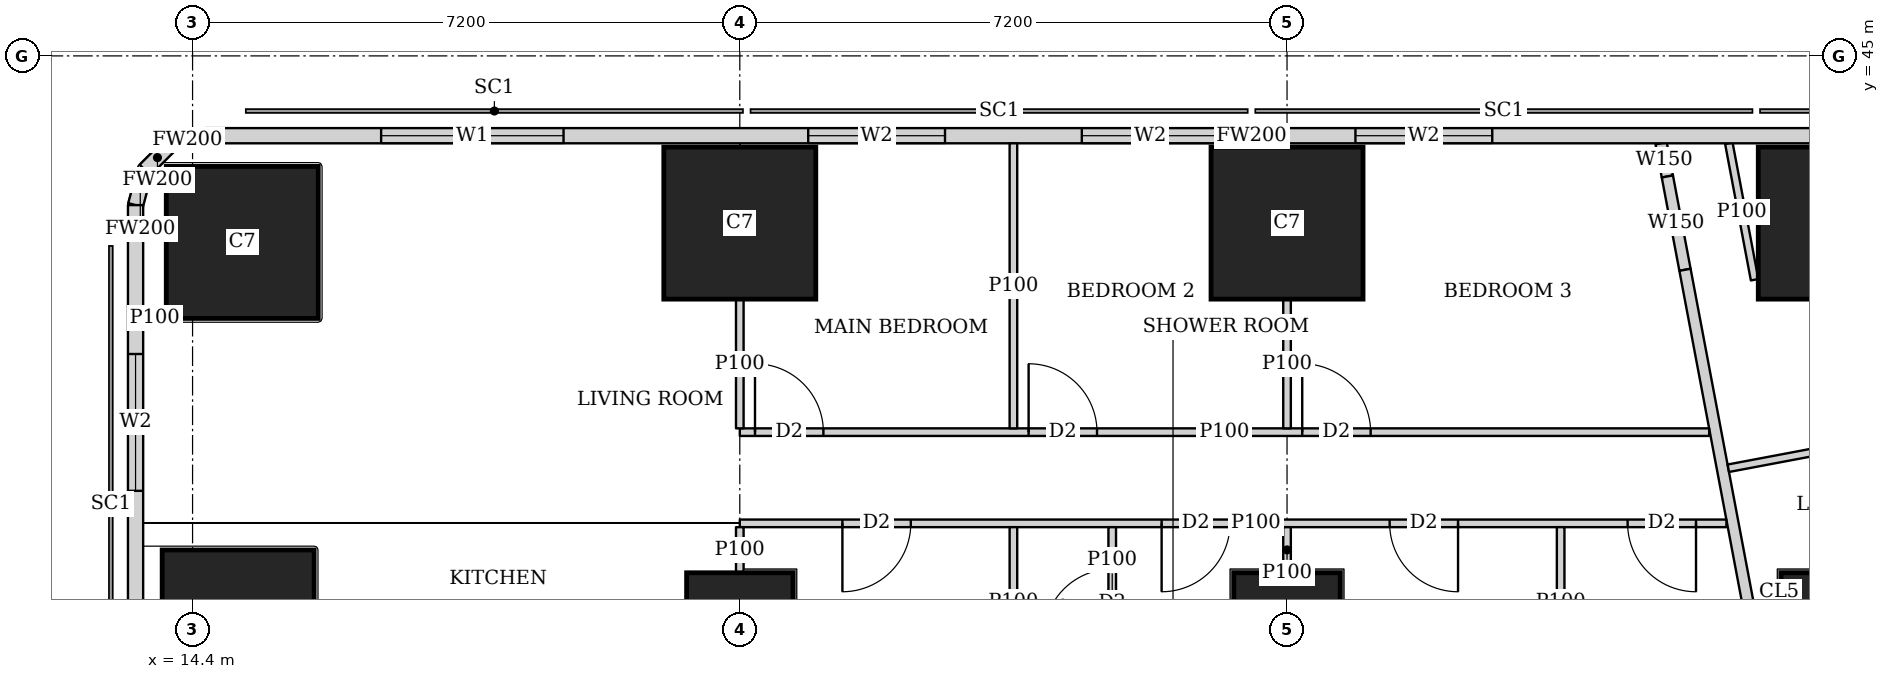
"""IFC4 building model, lengths in metres.
Left out: names, types, materials, properties, quantities, classifications, styles, units other than length and angle.
Written with IfcOpenShell. Run it as: python <this file> out.ifc"""

import sys

from ifc_helpers import new_model, si_unit, direction, frame, frame_2d, origin, origin_2d, place, context, subcontext, project, spatial, rectangle, extrude, element, fill, save


model = new_model("IFC4")
c1 = context("Model", 3, precision=1e-05, world=origin(), true_north=direction((0.0, 1.0)))
c2 = subcontext(c1, "Body", "Model", "MODEL_VIEW")
j1 = project(units=[si_unit("LENGTHUNIT", "METRE"), si_unit("PLANEANGLEUNIT", "RADIAN")], contexts=[c1])
p1 = place(None, origin())
s1 = spatial("IfcSite", under=j1, at=p1, CompositionType="ELEMENT")
p2 = place(p1, origin())
s2 = spatial("IfcBuilding", under=s1, at=p2, CompositionType="ELEMENT")
p3 = place(p2, frame((0.0, 0.0, 266.6)))
s3 = spatial("IfcBuildingStorey", under=s2, at=p3, CompositionType="ELEMENT", Elevation=266.6)
p4 = place(p3, frame((15.0, 37.5, 0.0), z_axis=(0.0, 0.0, 1.0), x_axis=(1.0, 0.0, 0.0)))
e1 = element("IfcColumn", 1, at=p4, inside=s3, PredefinedType="COLUMN", context=c2, shape_type="SweptSolid", body=[
    extrude(rectangle(XDim=2.0, YDim=2.0, at=origin_2d()), origin(), (0.0, 0.0, 1.0), 3.75),
])
for number, where, z_axis, x_axis in (
    (2, (21.6, 37.5, 0.0), (0.0, 0.0, 1.0), (1.0, 0.0, 0.0)),
    (3, (28.8, 37.5, 0.0), (0.0, 0.0, 1.0), (1.0, 0.0, 0.0)),
    (4, (36.0, 37.5, 0.0), (0.0, 0.0, 1.0), (1.0, 0.0, 0.0)),
):
    element("IfcColumn", number, at=place(p3, frame(where, z_axis=z_axis, x_axis=x_axis)), inside=s3, PredefinedType="COLUMN", context=c2, shape_type="SweptSolid", body=[
        extrude(rectangle(XDim=1.4, YDim=1.4, at=origin_2d()), origin(), (0.0, 0.0, 1.0), 3.75),
    ])
for number, where, z_axis, x_axis in (
    (5, (15.054, 42.546, 0.0), (0.0, 0.0, 1.0), (1.0, 0.0, 0.0)),
    (6, (21.6, 42.8, 0.0), (0.0, 0.0, 1.0), (1.0, 0.0, 0.0)),
    (7, (28.8, 42.8, 0.0), (0.0, 0.0, 1.0), (1.0, 0.0, 0.0)),
    (8, (36.0, 42.8, 0.0), (0.0, 0.0, 1.0), (1.0, 0.0, 0.0)),
):
    element("IfcColumn", number, at=place(p3, frame(where, z_axis=z_axis, x_axis=x_axis)), inside=s3, PredefinedType="COLUMN", context=c2, shape_type="SweptSolid", body=[
        extrude(rectangle(XDim=2.0, YDim=2.0, at=origin_2d()), origin(), (0.0, 0.0, 1.0), 3.75),
    ])
p5 = place(p3, frame((42.103, 43.95, 0.0), z_axis=(0.0, 0.0, 1.0), x_axis=(-1.0, 0.0, 0.0)))
e9 = element("IfcWall", 9, at=p5, inside=s3, PredefinedType="SOLIDWALL", context=c2, shape_type="SweptSolid", body=[
    extrude(rectangle(XDim=27.54, YDim=0.2, at=frame_2d((13.77, 0.0))), origin(), (0.0, 0.0, 1.0), 3.5),
])
p6 = place(p5, frame((10.603, 0.0, 0.9)))
e10 = element("IfcOpeningElement", 10, at=p6, cuts=e9, PredefinedType="OPENING", context=c2, shape_type="SweptSolid", body=[
    extrude(rectangle(XDim=1.8, YDim=1.5, at=frame_2d((0.9, 0.75))), frame((0.0, 0.11, 0.0), z_axis=(0.0, -1.0, 0.0), x_axis=(1.0, 0.0, 0.0)), (0.0, 0.0, 1.0), 0.22),
])
p7 = place(p5, frame((14.203, 0.0, 0.9)))
e11 = element("IfcOpeningElement", 11, at=p7, cuts=e9, PredefinedType="OPENING", context=c2, shape_type="SweptSolid", body=[
    extrude(rectangle(XDim=1.8, YDim=1.5, at=frame_2d((0.9, 0.75))), frame((0.0, 0.11, 0.0), z_axis=(0.0, -1.0, 0.0), x_axis=(1.0, 0.0, 0.0)), (0.0, 0.0, 1.0), 0.22),
])
p8 = place(p5, frame((17.803, 0.0, 0.9)))
e12 = element("IfcOpeningElement", 12, at=p8, cuts=e9, PredefinedType="OPENING", context=c2, shape_type="SweptSolid", body=[
    extrude(rectangle(XDim=1.8, YDim=1.5, at=frame_2d((0.9, 0.75))), frame((0.0, 0.11, 0.0), z_axis=(0.0, -1.0, 0.0), x_axis=(1.0, 0.0, 0.0)), (0.0, 0.0, 1.0), 0.22),
])
p9 = place(p5, frame((22.822, 0.0, 0.9)))
e13 = element("IfcOpeningElement", 13, at=p9, cuts=e9, PredefinedType="OPENING", context=c2, shape_type="SweptSolid", body=[
    extrude(rectangle(XDim=2.4, YDim=1.5, at=frame_2d((1.2, 0.75))), frame((0.0, 0.11, 0.0), z_axis=(0.0, -1.0, 0.0), x_axis=(1.0, 0.0, 0.0)), (0.0, 0.0, 1.0), 0.22),
])
p10 = place(p3, frame((14.563, 43.95, 0.0), z_axis=(0.0, 0.0, 1.0), x_axis=(-0.965655254015, -0.259826731483, 0.0)))
e14 = element("IfcWall", 14, at=p10, inside=s3, PredefinedType="SOLIDWALL", context=c2, shape_type="SweptSolid", body=[
    extrude(rectangle(XDim=0.477, YDim=0.2, at=frame_2d((0.239, 0.0))), origin(), (0.0, 0.0, 1.0), 3.5),
])
p11 = place(p3, frame((14.102, 43.826, 0.0), z_axis=(0.0, 0.0, 1.0), x_axis=(-0.707369890659, -0.706843573776, 0.0)))
e15 = element("IfcWall", 15, at=p11, inside=s3, PredefinedType="SOLIDWALL", context=c2, shape_type="SweptSolid", body=[
    extrude(rectangle(XDim=0.464, YDim=0.2, at=frame_2d((0.232, 0.0))), origin(), (0.0, 0.0, 1.0), 3.5),
])
p12 = place(p3, frame((13.774, 43.498, 0.0), z_axis=(0.0, 0.0, 1.0), x_axis=(-0.259826731483, -0.965655254015, 0.0)))
e16 = element("IfcWall", 16, at=p12, inside=s3, PredefinedType="SOLIDWALL", context=c2, shape_type="SweptSolid", body=[
    extrude(rectangle(XDim=0.477, YDim=0.2, at=frame_2d((0.239, 0.0))), origin(), (0.0, 0.0, 1.0), 3.5),
])
p13 = place(p3, frame((13.65, 43.037, 0.0), z_axis=(0.0, 0.0, 1.0), x_axis=(0.0, -1.0, 0.0)))
e17 = element("IfcWall", 17, at=p13, inside=s3, PredefinedType="SOLIDWALL", context=c2, shape_type="SweptSolid", body=[
    extrude(rectangle(XDim=35.374, YDim=0.2, at=frame_2d((17.687, 0.0))), origin(), (0.0, 0.0, 1.0), 3.5),
])
p14 = place(p13, frame((1.959, 0.0, 0.9)))
e18 = element("IfcOpeningElement", 18, at=p14, cuts=e17, PredefinedType="OPENING", context=c2, shape_type="SweptSolid", body=[
    extrude(rectangle(XDim=1.8, YDim=1.5, at=frame_2d((0.9, 0.75))), frame((0.0, 0.11, 0.0), z_axis=(0.0, -1.0, 0.0), x_axis=(1.0, 0.0, 0.0)), (0.0, 0.0, 1.0), 0.22),
])
p15 = place(p3, frame((33.722, 43.85, 0.0), z_axis=(0.0, 0.0, 1.0), x_axis=(0.184886516626, -0.982759877066, 0.0)))
e19 = element("IfcWall", 19, at=p15, inside=s3, PredefinedType="SOLIDWALL", context=c2, shape_type="SweptSolid", body=[
    extrude(rectangle(XDim=0.444, YDim=0.15, at=frame_2d((0.222, 0.0))), origin(), (0.0, 0.0, 1.0), 3.5),
])
p16 = place(p3, frame((33.804, 43.414, 0.0), z_axis=(0.0, 0.0, 1.0), x_axis=(0.185585816539, -0.982628060204, 0.0)))
e20 = element("IfcWall", 20, at=p16, inside=s3, PredefinedType="SOLIDWALL", context=c2, shape_type="SweptSolid", body=[
    extrude(rectangle(XDim=1.25, YDim=0.15, at=frame_2d((0.625, 0.0))), origin(), (0.0, 0.0, 1.0), 2.05),
])
p17 = place(p3, frame((34.036, 42.186, 0.0), z_axis=(0.0, 0.0, 1.0), x_axis=(0.185593518645, -0.9826266055, 0.0)))
e21 = element("IfcWall", 21, at=p17, inside=s3, PredefinedType="SOLIDWALL", context=c2, shape_type="SweptSolid", body=[
    extrude(rectangle(XDim=35.961, YDim=0.15, at=frame_2d((17.98, 0.0))), origin(), (0.0, 0.0, 1.0), 2.5),
])
p18 = place(p17, frame((15.529, 0.0, 0.0)))
e22 = element("IfcOpeningElement", 22, at=p18, cuts=e21, PredefinedType="OPENING", context=c2, shape_type="SweptSolid", body=[
    extrude(rectangle(XDim=1.0, YDim=2.1, at=frame_2d((0.5, 1.05))), frame((0.0, 0.085, 0.0), z_axis=(0.0, -1.0, 0.0), x_axis=(1.0, 0.0, 0.0)), (0.0, 0.0, 1.0), 0.17),
])
p19 = place(p17, frame((19.345, 0.0, 0.0)))
e23 = element("IfcOpeningElement", 23, at=p19, cuts=e21, PredefinedType="OPENING", context=c2, shape_type="SweptSolid", body=[
    extrude(rectangle(XDim=1.0, YDim=2.1, at=frame_2d((0.5, 1.05))), frame((0.0, 0.085, 0.0), z_axis=(0.0, -1.0, 0.0), x_axis=(1.0, 0.0, 0.0)), (0.0, 0.0, 1.0), 0.17),
])
p20 = place(p17, frame((30.594, 0.0, 0.0)))
e24 = element("IfcOpeningElement", 24, at=p20, cuts=e21, PredefinedType="OPENING", context=c2, shape_type="SweptSolid", body=[
    extrude(rectangle(XDim=1.0, YDim=2.1, at=frame_2d((0.5, 1.05))), frame((0.0, 0.085, 0.0), z_axis=(0.0, -1.0, 0.0), x_axis=(1.0, 0.0, 0.0)), (0.0, 0.0, 1.0), 0.17),
])
p21 = place(p3, frame((34.952, 42.055, 0.0), z_axis=(0.0, 0.0, 1.0), x_axis=(-0.185490642006, 0.98264603074, 0.0)))
e25 = element("IfcWall", 25, at=p21, inside=s3, PredefinedType="PARTITIONING", context=c2, shape_type="SweptSolid", body=[
    extrude(rectangle(XDim=1.827, YDim=0.1, at=frame_2d((0.914, 0.0))), origin(), (0.0, 0.0, 1.0), 2.05),
])
p22 = place(p3, frame((37.824, 40.182, 0.0), z_axis=(0.0, 0.0, 1.0), x_axis=(-0.982674977865, -0.185337227447, 0.0)))
e26 = element("IfcWall", 26, at=p22, inside=s3, PredefinedType="PARTITIONING", context=c2, shape_type="SweptSolid", body=[
    extrude(rectangle(XDim=3.275, YDim=0.1, at=frame_2d((1.637, 0.0))), origin(), (0.0, 0.0, 1.0), 3.5),
])
p23 = place(p3, frame((14.054, 41.546, 0.0), z_axis=(0.0, 0.0, 1.0), x_axis=(-1.0, 0.0, 0.0)))
e27 = element("IfcWall", 27, at=p23, inside=s3, PredefinedType="PARTITIONING", context=c2, shape_type="SweptSolid", body=[
    extrude(rectangle(XDim=0.304, YDim=0.1, at=frame_2d((0.152, 0.0))), origin(), (0.0, 0.0, 1.0), 3.5),
])
p24 = place(p3, frame((21.6, 40.05, 0.0), z_axis=(0.0, 0.0, 1.0), x_axis=(1.0, 0.0, 0.0)))
e28 = element("IfcWall", 28, at=p24, inside=s3, PredefinedType="PARTITIONING", context=c2, shape_type="SweptSolid", body=[
    extrude(rectangle(XDim=12.754, YDim=0.1, at=frame_2d((6.377, 0.0))), origin(), (0.0, 0.0, 1.0), 3.5),
])
p25 = place(p24, frame((0.2, 0.0, 0.0)))
e29 = element("IfcOpeningElement", 29, at=p25, cuts=e28, PredefinedType="OPENING", context=c2, shape_type="SweptSolid", body=[
    extrude(rectangle(XDim=0.9, YDim=2.1, at=frame_2d((0.45, 1.05))), frame((0.0, 0.06, 0.0), z_axis=(0.0, -1.0, 0.0), x_axis=(1.0, 0.0, 0.0)), (0.0, 0.0, 1.0), 0.12),
])
p26 = place(p24, frame((3.8, 0.0, 0.0)))
e30 = element("IfcOpeningElement", 30, at=p26, cuts=e28, PredefinedType="OPENING", context=c2, shape_type="SweptSolid", body=[
    extrude(rectangle(XDim=0.9, YDim=2.1, at=frame_2d((0.45, 1.05))), frame((0.0, 0.06, 0.0), z_axis=(0.0, -1.0, 0.0), x_axis=(1.0, 0.0, 0.0)), (0.0, 0.0, 1.0), 0.12),
])
p27 = place(p24, frame((7.4, 0.0, 0.0)))
e31 = element("IfcOpeningElement", 31, at=p27, cuts=e28, PredefinedType="OPENING", context=c2, shape_type="SweptSolid", body=[
    extrude(rectangle(XDim=0.9, YDim=2.1, at=frame_2d((0.45, 1.05))), frame((0.0, 0.06, 0.0), z_axis=(0.0, -1.0, 0.0), x_axis=(1.0, 0.0, 0.0)), (0.0, 0.0, 1.0), 0.12),
])
p28 = place(p3, frame((21.6, 38.85, 0.0), z_axis=(0.0, 0.0, 1.0), x_axis=(1.0, 0.0, 0.0)))
e32 = element("IfcWall", 32, at=p28, inside=s3, PredefinedType="PARTITIONING", context=c2, shape_type="SweptSolid", body=[
    extrude(rectangle(XDim=12.981, YDim=0.1, at=frame_2d((6.49, 0.0))), origin(), (0.0, 0.0, 1.0), 3.5),
])
p29 = place(p28, frame((1.35, 0.0, 0.0)))
e33 = element("IfcOpeningElement", 33, at=p29, cuts=e32, PredefinedType="OPENING", context=c2, shape_type="SweptSolid", body=[
    extrude(rectangle(XDim=0.9, YDim=2.1, at=frame_2d((0.45, 1.05))), frame((0.0, 0.06, 0.0), z_axis=(0.0, -1.0, 0.0), x_axis=(1.0, 0.0, 0.0)), (0.0, 0.0, 1.0), 0.12),
])
p30 = place(p28, frame((5.55, 0.0, 0.0)))
e34 = element("IfcOpeningElement", 34, at=p30, cuts=e32, PredefinedType="OPENING", context=c2, shape_type="SweptSolid", body=[
    extrude(rectangle(XDim=0.9, YDim=2.1, at=frame_2d((0.45, 1.05))), frame((0.0, 0.06, 0.0), z_axis=(0.0, -1.0, 0.0), x_axis=(1.0, 0.0, 0.0)), (0.0, 0.0, 1.0), 0.12),
])
p31 = place(p28, frame((8.55, 0.0, 0.0)))
e35 = element("IfcOpeningElement", 35, at=p31, cuts=e32, PredefinedType="OPENING", context=c2, shape_type="SweptSolid", body=[
    extrude(rectangle(XDim=0.9, YDim=2.1, at=frame_2d((0.45, 1.05))), frame((0.0, 0.06, 0.0), z_axis=(0.0, -1.0, 0.0), x_axis=(1.0, 0.0, 0.0)), (0.0, 0.0, 1.0), 0.12),
])
p32 = place(p28, frame((11.681, 0.0, 0.0)))
e36 = element("IfcOpeningElement", 36, at=p32, cuts=e32, PredefinedType="OPENING", context=c2, shape_type="SweptSolid", body=[
    extrude(rectangle(XDim=0.9, YDim=2.1, at=frame_2d((0.45, 1.05))), frame((0.0, 0.06, 0.0), z_axis=(0.0, -1.0, 0.0), x_axis=(1.0, 0.0, 0.0)), (0.0, 0.0, 1.0), 0.12),
])
p33 = place(p3, frame((21.6, 40.1, 0.0), z_axis=(0.0, 0.0, 1.0), x_axis=(0.0, 1.0, 0.0)))
e37 = element("IfcWall", 37, at=p33, inside=s3, PredefinedType="PARTITIONING", context=c2, shape_type="SweptSolid", body=[
    extrude(rectangle(XDim=1.699, YDim=0.1, at=frame_2d((0.85, 0.0))), origin(), (0.0, 0.0, 1.0), 3.5),
])
p34 = place(p3, frame((25.2, 40.1, 0.0), z_axis=(0.0, 0.0, 1.0), x_axis=(0.0, 1.0, 0.0)))
e38 = element("IfcWall", 38, at=p34, inside=s3, PredefinedType="PARTITIONING", context=c2, shape_type="SweptSolid", body=[
    extrude(rectangle(XDim=3.75, YDim=0.1, at=frame_2d((1.875, 0.0))), origin(), (0.0, 0.0, 1.0), 2.05),
])
p35 = place(p3, frame((28.8, 40.1, 0.0), z_axis=(0.0, 0.0, 1.0), x_axis=(0.0, 1.0, 0.0)))
e39 = element("IfcWall", 39, at=p35, inside=s3, PredefinedType="PARTITIONING", context=c2, shape_type="SweptSolid", body=[
    extrude(rectangle(XDim=1.699, YDim=0.1, at=frame_2d((0.85, 0.0))), origin(), (0.0, 0.0, 1.0), 3.5),
])
p36 = place(p3, frame((21.6, 38.201, 0.0), z_axis=(0.0, 0.0, 1.0), x_axis=(0.0, 1.0, 0.0)))
e40 = element("IfcWall", 40, at=p36, inside=s3, PredefinedType="PARTITIONING", context=c2, shape_type="SweptSolid", body=[
    extrude(rectangle(XDim=0.599, YDim=0.1, at=frame_2d((0.3, 0.0))), origin(), (0.0, 0.0, 1.0), 3.5),
])
p37 = place(p3, frame((25.2, 36.825, 0.0), z_axis=(0.0, 0.0, 1.0), x_axis=(0.0, 1.0, 0.0)))
e41 = element("IfcWall", 41, at=p37, inside=s3, PredefinedType="PARTITIONING", context=c2, shape_type="SweptSolid", body=[
    extrude(rectangle(XDim=1.975, YDim=0.1, at=frame_2d((0.988, 0.0))), origin(), (0.0, 0.0, 1.0), 3.5),
])
p38 = place(p3, frame((28.8, 38.201, 0.0), z_axis=(0.0, 0.0, 1.0), x_axis=(0.0, 1.0, 0.0)))
e42 = element("IfcWall", 42, at=p38, inside=s3, PredefinedType="PARTITIONING", context=c2, shape_type="SweptSolid", body=[
    extrude(rectangle(XDim=0.599, YDim=0.1, at=frame_2d((0.3, 0.0))), origin(), (0.0, 0.0, 1.0), 3.5),
])
p39 = place(p3, frame((32.4, 36.825, 0.0), z_axis=(0.0, 0.0, 1.0), x_axis=(0.0, 1.0, 0.0)))
e43 = element("IfcWall", 43, at=p39, inside=s3, PredefinedType="PARTITIONING", context=c2, shape_type="SweptSolid", body=[
    extrude(rectangle(XDim=1.975, YDim=0.1, at=frame_2d((0.988, 0.0))), origin(), (0.0, 0.0, 1.0), 3.5),
])
p40 = place(p3, frame((26.5, 36.825, 0.0), z_axis=(0.0, 0.0, 1.0), x_axis=(0.0, 1.0, 0.0)))
e44 = element("IfcWall", 44, at=p40, inside=s3, PredefinedType="PARTITIONING", context=c2, shape_type="SweptSolid", body=[
    extrude(rectangle(XDim=1.975, YDim=0.1, at=frame_2d((0.988, 0.0))), origin(), (0.0, 0.0, 1.0), 3.5),
])
p41 = place(p40, frame((0.525, 0.0, 0.0)))
e45 = element("IfcOpeningElement", 45, at=p41, cuts=e44, PredefinedType="OPENING", context=c2, shape_type="SweptSolid", body=[
    extrude(rectangle(XDim=0.9, YDim=2.1, at=frame_2d((0.45, 1.05))), frame((0.0, 0.06, 0.0), z_axis=(0.0, -1.0, 0.0), x_axis=(1.0, 0.0, 0.0)), (0.0, 0.0, 1.0), 0.12),
])
p42 = place(p6, origin())
e46 = element("IfcWindow", 46, at=p42, inside=s3, PartitioningType="SINGLE_PANEL", PredefinedType="WINDOW", context=c2, shape_type="SweptSolid", body=[
    extrude(rectangle(XDim=1.8, YDim=1.5, at=frame_2d((0.9, 0.75))), frame((0.0, 0.03, 0.0), z_axis=(0.0, -1.0, 0.0), x_axis=(1.0, 0.0, 0.0)), (0.0, 0.0, 1.0), 0.06),
])
fill(e10, e46)
p43 = place(p7, origin())
e47 = element("IfcWindow", 47, at=p43, inside=s3, PartitioningType="SINGLE_PANEL", PredefinedType="WINDOW", context=c2, shape_type="SweptSolid", body=[
    extrude(rectangle(XDim=1.8, YDim=1.5, at=frame_2d((0.9, 0.75))), frame((0.0, 0.03, 0.0), z_axis=(0.0, -1.0, 0.0), x_axis=(1.0, 0.0, 0.0)), (0.0, 0.0, 1.0), 0.06),
])
fill(e11, e47)
p44 = place(p8, origin())
e48 = element("IfcWindow", 48, at=p44, inside=s3, PartitioningType="SINGLE_PANEL", PredefinedType="WINDOW", context=c2, shape_type="SweptSolid", body=[
    extrude(rectangle(XDim=1.8, YDim=1.5, at=frame_2d((0.9, 0.75))), frame((0.0, 0.03, 0.0), z_axis=(0.0, -1.0, 0.0), x_axis=(1.0, 0.0, 0.0)), (0.0, 0.0, 1.0), 0.06),
])
fill(e12, e48)
p45 = place(p9, origin())
e49 = element("IfcWindow", 49, at=p45, inside=s3, PartitioningType="SINGLE_PANEL", PredefinedType="WINDOW", context=c2, shape_type="SweptSolid", body=[
    extrude(rectangle(XDim=2.4, YDim=1.5, at=frame_2d((1.2, 0.75))), frame((0.0, 0.03, 0.0), z_axis=(0.0, -1.0, 0.0), x_axis=(1.0, 0.0, 0.0)), (0.0, 0.0, 1.0), 0.06),
])
fill(e13, e49)
p46 = place(p14, origin())
e50 = element("IfcWindow", 50, at=p46, inside=s3, PartitioningType="SINGLE_PANEL", PredefinedType="WINDOW", context=c2, shape_type="SweptSolid", body=[
    extrude(rectangle(XDim=1.8, YDim=1.5, at=frame_2d((0.9, 0.75))), frame((0.0, 0.03, 0.0), z_axis=(0.0, -1.0, 0.0), x_axis=(1.0, 0.0, 0.0)), (0.0, 0.0, 1.0), 0.06),
])
fill(e18, e50)
p47 = place(p25, origin())
e51 = element("IfcDoor", 51, at=p47, inside=s3, OperationType="SINGLE_SWING_LEFT", PredefinedType="DOOR", context=c2, shape_type="SweptSolid", body=[
    extrude(rectangle(XDim=0.9, YDim=2.1, at=frame_2d((0.45, 1.05))), frame((0.0, 0.025, 0.0), z_axis=(0.0, -1.0, 0.0), x_axis=(1.0, 0.0, 0.0)), (0.0, 0.0, 1.0), 0.05),
])
fill(e29, e51)
p48 = place(p26, origin())
e52 = element("IfcDoor", 52, at=p48, inside=s3, OperationType="SINGLE_SWING_LEFT", PredefinedType="DOOR", context=c2, shape_type="SweptSolid", body=[
    extrude(rectangle(XDim=0.9, YDim=2.1, at=frame_2d((0.45, 1.05))), frame((0.0, 0.025, 0.0), z_axis=(0.0, -1.0, 0.0), x_axis=(1.0, 0.0, 0.0)), (0.0, 0.0, 1.0), 0.05),
])
fill(e30, e52)
p49 = place(p27, origin())
e53 = element("IfcDoor", 53, at=p49, inside=s3, OperationType="SINGLE_SWING_LEFT", PredefinedType="DOOR", context=c2, shape_type="SweptSolid", body=[
    extrude(rectangle(XDim=0.9, YDim=2.1, at=frame_2d((0.45, 1.05))), frame((0.0, 0.025, 0.0), z_axis=(0.0, -1.0, 0.0), x_axis=(1.0, 0.0, 0.0)), (0.0, 0.0, 1.0), 0.05),
])
fill(e31, e53)
p50 = place(p29, origin())
e54 = element("IfcDoor", 54, at=p50, inside=s3, OperationType="SINGLE_SWING_RIGHT", PredefinedType="DOOR", context=c2, shape_type="SweptSolid", body=[
    extrude(rectangle(XDim=0.9, YDim=2.1, at=frame_2d((0.45, 1.05))), frame((0.0, 0.025, 0.0), z_axis=(0.0, -1.0, 0.0), x_axis=(1.0, 0.0, 0.0)), (0.0, 0.0, 1.0), 0.05),
])
fill(e33, e54)
p51 = place(p30, origin())
e55 = element("IfcDoor", 55, at=p51, inside=s3, OperationType="SINGLE_SWING_RIGHT", PredefinedType="DOOR", context=c2, shape_type="SweptSolid", body=[
    extrude(rectangle(XDim=0.9, YDim=2.1, at=frame_2d((0.45, 1.05))), frame((0.0, 0.025, 0.0), z_axis=(0.0, -1.0, 0.0), x_axis=(1.0, 0.0, 0.0)), (0.0, 0.0, 1.0), 0.05),
])
fill(e34, e55)
p52 = place(p31, origin())
e56 = element("IfcDoor", 56, at=p52, inside=s3, OperationType="SINGLE_SWING_LEFT", PredefinedType="DOOR", context=c2, shape_type="SweptSolid", body=[
    extrude(rectangle(XDim=0.9, YDim=2.1, at=frame_2d((0.45, 1.05))), frame((0.0, 0.025, 0.0), z_axis=(0.0, -1.0, 0.0), x_axis=(1.0, 0.0, 0.0)), (0.0, 0.0, 1.0), 0.05),
])
fill(e35, e56)
p53 = place(p32, origin())
e57 = element("IfcDoor", 57, at=p53, inside=s3, OperationType="SINGLE_SWING_LEFT", PredefinedType="DOOR", context=c2, shape_type="SweptSolid", body=[
    extrude(rectangle(XDim=0.9, YDim=2.1, at=frame_2d((0.45, 1.05))), frame((0.0, 0.025, 0.0), z_axis=(0.0, -1.0, 0.0), x_axis=(1.0, 0.0, 0.0)), (0.0, 0.0, 1.0), 0.05),
])
fill(e36, e57)
p54 = place(p41, origin())
e58 = element("IfcDoor", 58, at=p54, inside=s3, OperationType="SINGLE_SWING_LEFT", PredefinedType="DOOR", context=c2, shape_type="SweptSolid", body=[
    extrude(rectangle(XDim=0.9, YDim=2.1, at=frame_2d((0.45, 1.05))), frame((0.0, 0.025, 0.0), z_axis=(0.0, -1.0, 0.0), x_axis=(1.0, 0.0, 0.0)), (0.0, 0.0, 1.0), 0.05),
])
fill(e45, e58)
save(model, sys.argv[1])
